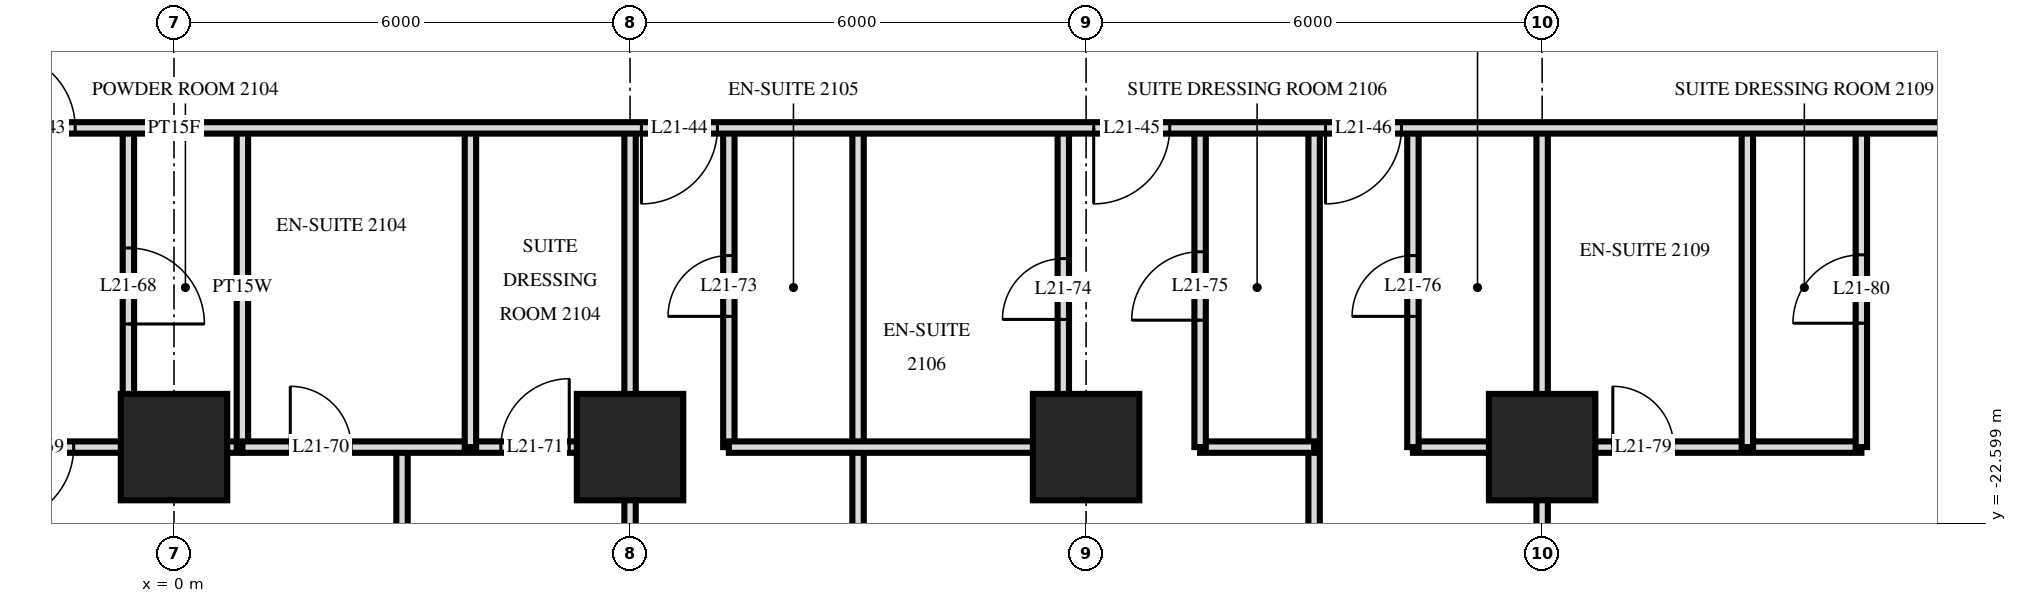
"""IFC4 building model, lengths in metres.
Left out: names, types, materials, properties, quantities, classifications, styles, units other than length and angle.
Written with IfcOpenShell. Run it as: python <this file> out.ifc"""

import sys

from ifc_helpers import new_model, si_unit, direction, frame, frame_2d, origin, origin_2d, place, context, subcontext, project, spatial, rectangle, extrude, element, fill, save


model = new_model("IFC4")
c1 = context("Model", 3, precision=1e-05, world=origin(), true_north=direction((0.0, 1.0)))
c2 = subcontext(c1, "Body", "Model", "MODEL_VIEW")
j1 = project(units=[si_unit("LENGTHUNIT", "METRE"), si_unit("PLANEANGLEUNIT", "RADIAN")], contexts=[c1])
p1 = place(None, origin())
s1 = spatial("IfcSite", under=j1, at=p1, CompositionType="ELEMENT")
p2 = place(p1, origin())
s2 = spatial("IfcBuilding", under=s1, at=p2, CompositionType="ELEMENT")
p3 = place(p2, frame((0.0, 0.0, 85.2)))
s3 = spatial("IfcBuildingStorey", under=s2, at=p3, CompositionType="ELEMENT", Elevation=85.2)
for number, where, z_axis, x_axis in (
    (1, (0.0, -21.6, 0.0), (0.0, 0.0, 1.0), (1.0, 0.0, 0.0)),
    (2, (6.0, -21.6, 0.0), (0.0, 0.0, 1.0), (1.0, 0.0, 0.0)),
    (3, (12.0, -21.6, 0.0), (0.0, 0.0, 1.0), (1.0, 0.0, 0.0)),
    (4, (18.0, -21.6, 0.0), (0.0, 0.0, 1.0), (1.0, 0.0, 0.0)),
):
    element("IfcColumn", number, at=place(p3, frame(where, z_axis=z_axis, x_axis=x_axis)), inside=s3, PredefinedType="COLUMN", context=c2, shape_type="SweptSolid", body=[
        extrude(rectangle(XDim=1.4, YDim=1.4, at=origin_2d()), origin(), (0.0, 0.0, 1.0), 3.6),
    ])
p4 = place(p3, frame((22.2, -21.6, 0.0), z_axis=(0.0, 0.0, 1.0), x_axis=(0.0, 1.0, 0.0)))
e5 = element("IfcWall", 5, at=p4, inside=s3, PredefinedType="PARTITIONING", context=c2, shape_type="SweptSolid", body=[
    extrude(rectangle(XDim=4.2, YDim=0.15, at=frame_2d((2.1, 0.0))), origin(), (0.0, 0.0, 1.0), 3.32),
])
p5 = place(p4, frame((1.63, 0.0, 0.0)))
e6 = element("IfcOpeningElement", 6, at=p5, cuts=e5, PredefinedType="OPENING", context=c2, shape_type="SweptSolid", body=[
    extrude(rectangle(XDim=0.9, YDim=2.1, at=frame_2d((0.45, 1.05))), frame((0.0, 0.085, 0.0), z_axis=(0.0, -1.0, 0.0), x_axis=(1.0, 0.0, 0.0)), (0.0, 0.0, 1.0), 0.17),
])
p6 = place(p3, frame((20.7, -21.6, 0.0), z_axis=(0.0, 0.0, 1.0), x_axis=(0.0, 1.0, 0.0)))
e7 = element("IfcWall", 7, at=p6, inside=s3, PredefinedType="PARTITIONING", context=c2, shape_type="SweptSolid", body=[
    extrude(rectangle(XDim=4.2, YDim=0.15, at=frame_2d((2.1, 0.0))), origin(), (0.0, 0.0, 1.0), 3.32),
])
p7 = place(p3, frame((18.0, -29.22, 0.0), z_axis=(0.0, 0.0, 1.0), x_axis=(0.0, 1.0, 0.0)))
e8 = element("IfcWall", 8, at=p7, inside=s3, PredefinedType="PARTITIONING", context=c2, shape_type="SweptSolid", body=[
    extrude(rectangle(XDim=11.82, YDim=0.15, at=frame_2d((5.91, 0.0))), origin(), (0.0, 0.0, 1.0), 3.32),
])
p8 = place(p3, frame((16.3, -21.6, 0.0), z_axis=(0.0, 0.0, 1.0), x_axis=(0.0, 1.0, 0.0)))
e9 = element("IfcWall", 9, at=p8, inside=s3, PredefinedType="PARTITIONING", context=c2, shape_type="SweptSolid", body=[
    extrude(rectangle(XDim=4.2, YDim=0.15, at=frame_2d((2.1, 0.0))), origin(), (0.0, 0.0, 1.0), 3.32),
])
p9 = place(p8, frame((1.72, 0.0, 0.0)))
e10 = element("IfcOpeningElement", 10, at=p9, cuts=e9, PredefinedType="OPENING", context=c2, shape_type="SweptSolid", body=[
    extrude(rectangle(XDim=0.8, YDim=2.1, at=frame_2d((0.4, 1.05))), frame((0.0, 0.085, 0.0), z_axis=(0.0, -1.0, 0.0), x_axis=(1.0, 0.0, 0.0)), (0.0, 0.0, 1.0), 0.17),
])
p10 = place(p3, frame((15.0, -29.22, 0.0), z_axis=(0.0, 0.0, 1.0), x_axis=(0.0, 1.0, 0.0)))
e11 = element("IfcWall", 11, at=p10, inside=s3, PredefinedType="PARTITIONING", context=c2, shape_type="SweptSolid", body=[
    extrude(rectangle(XDim=11.82, YDim=0.15, at=frame_2d((5.91, 0.0))), origin(), (0.0, 0.0, 1.0), 3.32),
])
p11 = place(p3, frame((13.5, -21.6, 0.0), z_axis=(0.0, 0.0, 1.0), x_axis=(0.0, 1.0, 0.0)))
e12 = element("IfcWall", 12, at=p11, inside=s3, PredefinedType="PARTITIONING", context=c2, shape_type="SweptSolid", body=[
    extrude(rectangle(XDim=4.2, YDim=0.15, at=frame_2d((2.1, 0.0))), origin(), (0.0, 0.0, 1.0), 3.32),
])
p12 = place(p11, frame((1.67, 0.0, 0.0)))
e13 = element("IfcOpeningElement", 13, at=p12, cuts=e12, PredefinedType="OPENING", context=c2, shape_type="SweptSolid", body=[
    extrude(rectangle(XDim=0.9, YDim=2.1, at=frame_2d((0.45, 1.05))), frame((0.0, 0.085, 0.0), z_axis=(0.0, -1.0, 0.0), x_axis=(1.0, 0.0, 0.0)), (0.0, 0.0, 1.0), 0.17),
])
p13 = place(p3, frame((11.7, -21.6, 0.0), z_axis=(0.0, 0.0, 1.0), x_axis=(0.0, 1.0, 0.0)))
e14 = element("IfcWall", 14, at=p13, inside=s3, PredefinedType="PARTITIONING", context=c2, shape_type="SweptSolid", body=[
    extrude(rectangle(XDim=4.2, YDim=0.15, at=frame_2d((2.1, 0.0))), origin(), (0.0, 0.0, 1.0), 3.32),
])
p14 = place(p13, frame((1.68, 0.0, 0.0)))
e15 = element("IfcOpeningElement", 15, at=p14, cuts=e14, PredefinedType="OPENING", context=c2, shape_type="SweptSolid", body=[
    extrude(rectangle(XDim=0.8, YDim=2.1, at=frame_2d((0.4, 1.05))), frame((0.0, 0.085, 0.0), z_axis=(0.0, -1.0, 0.0), x_axis=(1.0, 0.0, 0.0)), (0.0, 0.0, 1.0), 0.17),
])
p15 = place(p3, frame((9.0, -29.22, 0.0), z_axis=(0.0, 0.0, 1.0), x_axis=(0.0, 1.0, 0.0)))
e16 = element("IfcWall", 16, at=p15, inside=s3, PredefinedType="PARTITIONING", context=c2, shape_type="SweptSolid", body=[
    extrude(rectangle(XDim=11.82, YDim=0.15, at=frame_2d((5.91, 0.0))), origin(), (0.0, 0.0, 1.0), 3.32),
])
p16 = place(p3, frame((7.3, -21.6, 0.0), z_axis=(0.0, 0.0, 1.0), x_axis=(0.0, 1.0, 0.0)))
e17 = element("IfcWall", 17, at=p16, inside=s3, PredefinedType="PARTITIONING", context=c2, shape_type="SweptSolid", body=[
    extrude(rectangle(XDim=4.2, YDim=0.15, at=frame_2d((2.1, 0.0))), origin(), (0.0, 0.0, 1.0), 3.32),
])
p17 = place(p16, frame((1.72, 0.0, 0.0)))
e18 = element("IfcOpeningElement", 18, at=p17, cuts=e17, PredefinedType="OPENING", context=c2, shape_type="SweptSolid", body=[
    extrude(rectangle(XDim=0.8, YDim=2.1, at=frame_2d((0.4, 1.05))), frame((0.0, 0.085, 0.0), z_axis=(0.0, -1.0, 0.0), x_axis=(1.0, 0.0, 0.0)), (0.0, 0.0, 1.0), 0.17),
])
p18 = place(p3, frame((6.0, -29.22, 0.0), z_axis=(0.0, 0.0, 1.0), x_axis=(0.0, 1.0, 0.0)))
e19 = element("IfcWall", 19, at=p18, inside=s3, PredefinedType="PARTITIONING", context=c2, shape_type="SweptSolid", body=[
    extrude(rectangle(XDim=11.82, YDim=0.15, at=frame_2d((5.91, 0.0))), origin(), (0.0, 0.0, 1.0), 3.32),
])
p19 = place(p3, frame((3.9, -21.6, 0.0), z_axis=(0.0, 0.0, 1.0), x_axis=(0.0, 1.0, 0.0)))
e20 = element("IfcWall", 20, at=p19, inside=s3, PredefinedType="PARTITIONING", context=c2, shape_type="SweptSolid", body=[
    extrude(rectangle(XDim=4.2, YDim=0.15, at=frame_2d((2.1, 0.0))), origin(), (0.0, 0.0, 1.0), 3.32),
])
p20 = place(p3, frame((3.0, -29.22, 0.0), z_axis=(0.0, 0.0, 1.0), x_axis=(0.0, 1.0, 0.0)))
e21 = element("IfcWall", 21, at=p20, inside=s3, PredefinedType="PARTITIONING", context=c2, shape_type="SweptSolid", body=[
    extrude(rectangle(XDim=7.62, YDim=0.15, at=frame_2d((3.81, 0.0))), origin(), (0.0, 0.0, 1.0), 3.32),
])
p21 = place(p20, frame((3.27, 0.0, 0.0)))
e22 = element("IfcOpeningElement", 22, at=p21, cuts=e21, PredefinedType="OPENING", context=c2, shape_type="SweptSolid", body=[
    extrude(rectangle(XDim=0.9, YDim=2.1, at=frame_2d((0.45, 1.05))), frame((0.0, 0.085, 0.0), z_axis=(0.0, -1.0, 0.0), x_axis=(1.0, 0.0, 0.0)), (0.0, 0.0, 1.0), 0.17),
])
p22 = place(p3, frame((0.9, -21.6, 0.0), z_axis=(0.0, 0.0, 1.0), x_axis=(0.0, 1.0, 0.0)))
e23 = element("IfcWall", 23, at=p22, inside=s3, PredefinedType="PLUMBINGWALL", context=c2, shape_type="SweptSolid", body=[
    extrude(rectangle(XDim=4.2, YDim=0.15, at=frame_2d((2.1, 0.0))), origin(), (0.0, 0.0, 1.0), 3.32),
])
p23 = place(p3, frame((-0.6, -21.6, 0.0), z_axis=(0.0, 0.0, 1.0), x_axis=(0.0, 1.0, 0.0)))
e24 = element("IfcWall", 24, at=p23, inside=s3, PredefinedType="PARTITIONING", context=c2, shape_type="SweptSolid", body=[
    extrude(rectangle(XDim=4.2, YDim=0.15, at=frame_2d((2.1, 0.0))), origin(), (0.0, 0.0, 1.0), 3.32),
])
p24 = place(p23, frame((1.62, 0.0, 0.0)))
e25 = element("IfcOpeningElement", 25, at=p24, cuts=e24, PredefinedType="OPENING", context=c2, shape_type="SweptSolid", body=[
    extrude(rectangle(XDim=1.0, YDim=2.1, at=frame_2d((0.5, 1.05))), frame((0.0, 0.085, 0.0), z_axis=(0.0, -1.0, 0.0), x_axis=(1.0, 0.0, 0.0)), (0.0, 0.0, 1.0), 0.17),
])
p25 = place(p3, frame((-5.4, -21.6, 0.0), z_axis=(0.0, 0.0, 1.0), x_axis=(1.0, 0.0, 0.0)))
e26 = element("IfcWall", 26, at=p25, inside=s3, PredefinedType="PARTITIONING", context=c2, shape_type="SweptSolid", body=[
    extrude(rectangle(XDim=4.8, YDim=0.15, at=frame_2d((2.4, 0.0))), origin(), (0.0, 0.0, 1.0), 3.32),
])
p26 = place(p25, frame((0.68, 0.0, 0.0)))
e27 = element("IfcOpeningElement", 27, at=p26, cuts=e26, PredefinedType="OPENING", context=c2, shape_type="SweptSolid", body=[
    extrude(rectangle(XDim=1.0, YDim=2.1, at=frame_2d((0.5, 1.05))), frame((0.0, 0.085, 0.0), z_axis=(0.0, -1.0, 0.0), x_axis=(1.0, 0.0, 0.0)), (0.0, 0.0, 1.0), 0.17),
])
p27 = place(p25, frame((3.08, 0.0, 0.0)))
e28 = element("IfcOpeningElement", 28, at=p27, cuts=e26, PredefinedType="OPENING", context=c2, shape_type="SweptSolid", body=[
    extrude(rectangle(XDim=1.0, YDim=2.1, at=frame_2d((0.5, 1.05))), frame((0.0, 0.085, 0.0), z_axis=(0.0, -1.0, 0.0), x_axis=(1.0, 0.0, 0.0)), (0.0, 0.0, 1.0), 0.17),
])
p28 = place(p3, frame((0.9, -21.6, 0.0), z_axis=(0.0, 0.0, 1.0), x_axis=(1.0, 0.0, 0.0)))
e29 = element("IfcWall", 29, at=p28, inside=s3, PredefinedType="PARTITIONING", context=c2, shape_type="SweptSolid", body=[
    extrude(rectangle(XDim=5.1, YDim=0.15, at=frame_2d((2.55, 0.0))), origin(), (0.0, 0.0, 1.0), 3.32),
])
p29 = place(p28, frame((0.63, 0.0, 0.0)))
e30 = element("IfcOpeningElement", 30, at=p29, cuts=e29, PredefinedType="OPENING", context=c2, shape_type="SweptSolid", body=[
    extrude(rectangle(XDim=0.8, YDim=2.1, at=frame_2d((0.4, 1.05))), frame((0.0, 0.085, 0.0), z_axis=(0.0, -1.0, 0.0), x_axis=(1.0, 0.0, 0.0)), (0.0, 0.0, 1.0), 0.17),
])
p30 = place(p28, frame((3.4, 0.0, 0.0)))
e31 = element("IfcOpeningElement", 31, at=p30, cuts=e29, PredefinedType="OPENING", context=c2, shape_type="SweptSolid", body=[
    extrude(rectangle(XDim=0.9, YDim=2.1, at=frame_2d((0.45, 1.05))), frame((0.0, 0.085, 0.0), z_axis=(0.0, -1.0, 0.0), x_axis=(1.0, 0.0, 0.0)), (0.0, 0.0, 1.0), 0.17),
])
p31 = place(p3, frame((7.3, -21.6, 0.0), z_axis=(0.0, 0.0, 1.0), x_axis=(1.0, 0.0, 0.0)))
e32 = element("IfcWall", 32, at=p31, inside=s3, PredefinedType="PARTITIONING", context=c2, shape_type="SweptSolid", body=[
    extrude(rectangle(XDim=4.4, YDim=0.15, at=frame_2d((2.2, 0.0))), origin(), (0.0, 0.0, 1.0), 3.32),
])
p32 = place(p3, frame((13.5, -21.6, 0.0), z_axis=(0.0, 0.0, 1.0), x_axis=(1.0, 0.0, 0.0)))
e33 = element("IfcWall", 33, at=p32, inside=s3, PredefinedType="PARTITIONING", context=c2, shape_type="SweptSolid", body=[
    extrude(rectangle(XDim=1.5, YDim=0.15, at=frame_2d((0.75, 0.0))), origin(), (0.0, 0.0, 1.0), 3.32),
])
p33 = place(p3, frame((16.3, -21.6, 0.0), z_axis=(0.0, 0.0, 1.0), x_axis=(1.0, 0.0, 0.0)))
e34 = element("IfcWall", 34, at=p33, inside=s3, PredefinedType="PARTITIONING", context=c2, shape_type="SweptSolid", body=[
    extrude(rectangle(XDim=5.9, YDim=0.15, at=frame_2d((2.95, 0.0))), origin(), (0.0, 0.0, 1.0), 3.32),
])
p34 = place(p33, frame((2.63, 0.0, 0.0)))
e35 = element("IfcOpeningElement", 35, at=p34, cuts=e34, PredefinedType="OPENING", context=c2, shape_type="SweptSolid", body=[
    extrude(rectangle(XDim=0.8, YDim=2.1, at=frame_2d((0.4, 1.05))), frame((0.0, 0.085, 0.0), z_axis=(0.0, -1.0, 0.0), x_axis=(1.0, 0.0, 0.0)), (0.0, 0.0, 1.0), 0.17),
])
p35 = place(p3, frame((-0.6, -21.6, 0.0), z_axis=(0.0, 0.0, 1.0), x_axis=(1.0, 0.0, 0.0)))
e36 = element("IfcWall", 36, at=p35, inside=s3, PredefinedType="PLUMBINGWALL", context=c2, shape_type="SweptSolid", body=[
    extrude(rectangle(XDim=1.5, YDim=0.15, at=frame_2d((0.75, 0.0))), origin(), (0.0, 0.0, 1.0), 3.32),
])
p36 = place(p3, frame((-33.12, -17.4, 0.0), z_axis=(0.0, 0.0, 1.0), x_axis=(1.0, 0.0, 0.0)))
e37 = element("IfcWall", 37, at=p36, inside=s3, PredefinedType="PARTITIONING", context=c2, shape_type="SweptSolid", body=[
    extrude(rectangle(XDim=66.24, YDim=0.15, at=frame_2d((33.12, 0.0))), origin(), (0.0, 0.0, 1.0), 3.32),
])
p37 = place(p36, frame((10.27, 0.0, 0.0)))
e38 = element("IfcOpeningElement", 38, at=p37, cuts=e37, PredefinedType="OPENING", context=c2, shape_type="SweptSolid", body=[
    extrude(rectangle(XDim=1.0, YDim=2.1, at=frame_2d((0.5, 1.05))), frame((0.0, 0.085, 0.0), z_axis=(0.0, -1.0, 0.0), x_axis=(1.0, 0.0, 0.0)), (0.0, 0.0, 1.0), 0.17),
])
p38 = place(p36, frame((16.97, 0.0, 0.0)))
e39 = element("IfcOpeningElement", 39, at=p38, cuts=e37, PredefinedType="OPENING", context=c2, shape_type="SweptSolid", body=[
    extrude(rectangle(XDim=1.0, YDim=2.1, at=frame_2d((0.5, 1.05))), frame((0.0, 0.085, 0.0), z_axis=(0.0, -1.0, 0.0), x_axis=(1.0, 0.0, 0.0)), (0.0, 0.0, 1.0), 0.17),
])
p39 = place(p36, frame((28.42, 0.0, 0.0)))
e40 = element("IfcOpeningElement", 40, at=p39, cuts=e37, PredefinedType="OPENING", context=c2, shape_type="SweptSolid", body=[
    extrude(rectangle(XDim=1.0, YDim=2.1, at=frame_2d((0.5, 1.05))), frame((0.0, 0.085, 0.0), z_axis=(0.0, -1.0, 0.0), x_axis=(1.0, 0.0, 0.0)), (0.0, 0.0, 1.0), 0.17),
])
p40 = place(p36, frame((30.82, 0.0, 0.0)))
e41 = element("IfcOpeningElement", 41, at=p40, cuts=e37, PredefinedType="OPENING", context=c2, shape_type="SweptSolid", body=[
    extrude(rectangle(XDim=1.0, YDim=2.1, at=frame_2d((0.5, 1.05))), frame((0.0, 0.085, 0.0), z_axis=(0.0, -1.0, 0.0), x_axis=(1.0, 0.0, 0.0)), (0.0, 0.0, 1.0), 0.17),
])
p41 = place(p36, frame((39.27, 0.0, 0.0)))
e42 = element("IfcOpeningElement", 42, at=p41, cuts=e37, PredefinedType="OPENING", context=c2, shape_type="SweptSolid", body=[
    extrude(rectangle(XDim=1.0, YDim=2.1, at=frame_2d((0.5, 1.05))), frame((0.0, 0.085, 0.0), z_axis=(0.0, -1.0, 0.0), x_axis=(1.0, 0.0, 0.0)), (0.0, 0.0, 1.0), 0.17),
])
p42 = place(p36, frame((45.22, 0.0, 0.0)))
e43 = element("IfcOpeningElement", 43, at=p42, cuts=e37, PredefinedType="OPENING", context=c2, shape_type="SweptSolid", body=[
    extrude(rectangle(XDim=1.0, YDim=2.1, at=frame_2d((0.5, 1.05))), frame((0.0, 0.085, 0.0), z_axis=(0.0, -1.0, 0.0), x_axis=(1.0, 0.0, 0.0)), (0.0, 0.0, 1.0), 0.17),
])
p43 = place(p36, frame((48.27, 0.0, 0.0)))
e44 = element("IfcOpeningElement", 44, at=p43, cuts=e37, PredefinedType="OPENING", context=c2, shape_type="SweptSolid", body=[
    extrude(rectangle(XDim=1.0, YDim=2.1, at=frame_2d((0.5, 1.05))), frame((0.0, 0.085, 0.0), z_axis=(0.0, -1.0, 0.0), x_axis=(1.0, 0.0, 0.0)), (0.0, 0.0, 1.0), 0.17),
])
p44 = place(p36, frame((1.87, 0.0, 0.0)))
e45 = element("IfcOpeningElement", 45, at=p44, cuts=e37, PredefinedType="OPENING", context=c2, shape_type="SweptSolid", body=[
    extrude(rectangle(XDim=1.0, YDim=2.1, at=frame_2d((0.5, 1.05))), frame((0.0, 0.085, 0.0), z_axis=(0.0, -1.0, 0.0), x_axis=(1.0, 0.0, 0.0)), (0.0, 0.0, 1.0), 0.17),
])
p45 = place(p36, frame((60.37, 0.0, 0.0)))
e46 = element("IfcOpeningElement", 46, at=p45, cuts=e37, PredefinedType="OPENING", context=c2, shape_type="SweptSolid", body=[
    extrude(rectangle(XDim=1.0, YDim=2.1, at=frame_2d((0.5, 1.05))), frame((0.0, 0.085, 0.0), z_axis=(0.0, -1.0, 0.0), x_axis=(1.0, 0.0, 0.0)), (0.0, 0.0, 1.0), 0.17),
])
p46 = place(p40, origin())
e47 = element("IfcDoor", 47, at=p46, inside=s3, OperationType="SINGLE_SWING_RIGHT", PredefinedType="DOOR", context=c2, shape_type="SweptSolid", body=[
    extrude(rectangle(XDim=1.0, YDim=2.1, at=frame_2d((0.5, 1.05))), frame((0.0, 0.025, 0.0), z_axis=(0.0, -1.0, 0.0), x_axis=(1.0, 0.0, 0.0)), (0.0, 0.0, 1.0), 0.05),
])
fill(e41, e47)
p47 = place(p41, frame((0.5, 0.0, 0.0), z_axis=(0.0, 0.0, 1.0), x_axis=(-1.0, 0.0, 0.0)))
e48 = element("IfcDoor", 48, at=p47, inside=s3, OperationType="SINGLE_SWING_LEFT", PredefinedType="DOOR", context=c2, shape_type="SweptSolid", body=[
    extrude(rectangle(XDim=1.0, YDim=2.1, at=frame_2d((0.0, 1.05))), frame((0.0, -0.025, 0.0), z_axis=(0.0, 1.0, 0.0), x_axis=(-1.0, 0.0, 0.0)), (0.0, 0.0, 1.0), 0.05),
])
fill(e42, e48)
p48 = place(p42, frame((0.5, 0.0, 0.0), z_axis=(0.0, 0.0, 1.0), x_axis=(-1.0, 0.0, 0.0)))
e49 = element("IfcDoor", 49, at=p48, inside=s3, OperationType="SINGLE_SWING_LEFT", PredefinedType="DOOR", context=c2, shape_type="SweptSolid", body=[
    extrude(rectangle(XDim=1.0, YDim=2.1, at=frame_2d((0.0, 1.05))), frame((0.0, -0.025, 0.0), z_axis=(0.0, 1.0, 0.0), x_axis=(-1.0, 0.0, 0.0)), (0.0, 0.0, 1.0), 0.05),
])
fill(e43, e49)
p49 = place(p43, frame((0.5, 0.0, 0.0), z_axis=(0.0, 0.0, 1.0), x_axis=(-1.0, 0.0, 0.0)))
e50 = element("IfcDoor", 50, at=p49, inside=s3, OperationType="SINGLE_SWING_LEFT", PredefinedType="DOOR", context=c2, shape_type="SweptSolid", body=[
    extrude(rectangle(XDim=1.0, YDim=2.1, at=frame_2d((0.0, 1.05))), frame((0.0, -0.025, 0.0), z_axis=(0.0, 1.0, 0.0), x_axis=(-1.0, 0.0, 0.0)), (0.0, 0.0, 1.0), 0.05),
])
fill(e44, e50)
p50 = place(p24, frame((0.5, 0.0, 0.0), z_axis=(0.0, 0.0, 1.0), x_axis=(-1.0, 0.0, 0.0)))
e51 = element("IfcDoor", 51, at=p50, inside=s3, OperationType="SINGLE_SWING_LEFT", PredefinedType="DOOR", context=c2, shape_type="SweptSolid", body=[
    extrude(rectangle(XDim=1.0, YDim=2.1, at=frame_2d((0.0, 1.05))), frame((0.0, -0.025, 0.0), z_axis=(0.0, 1.0, 0.0), x_axis=(-1.0, 0.0, 0.0)), (0.0, 0.0, 1.0), 0.05),
])
fill(e25, e51)
p51 = place(p27, frame((0.5, 0.0, 0.0), z_axis=(0.0, 0.0, 1.0), x_axis=(-1.0, 0.0, 0.0)))
e52 = element("IfcDoor", 52, at=p51, inside=s3, OperationType="SINGLE_SWING_LEFT", PredefinedType="DOOR", context=c2, shape_type="SweptSolid", body=[
    extrude(rectangle(XDim=1.0, YDim=2.1, at=frame_2d((0.0, 1.05))), frame((0.0, -0.025, 0.0), z_axis=(0.0, 1.0, 0.0), x_axis=(-1.0, 0.0, 0.0)), (0.0, 0.0, 1.0), 0.05),
])
fill(e28, e52)
p52 = place(p29, origin())
e53 = element("IfcDoor", 53, at=p52, inside=s3, OperationType="SINGLE_SWING_RIGHT", PredefinedType="DOOR", context=c2, shape_type="SweptSolid", body=[
    extrude(rectangle(XDim=0.8, YDim=2.1, at=frame_2d((0.4, 1.05))), frame((0.0, 0.025, 0.0), z_axis=(0.0, -1.0, 0.0), x_axis=(1.0, 0.0, 0.0)), (0.0, 0.0, 1.0), 0.05),
])
fill(e30, e53)
p53 = place(p30, origin())
e54 = element("IfcDoor", 54, at=p53, inside=s3, OperationType="SINGLE_SWING_LEFT", PredefinedType="DOOR", context=c2, shape_type="SweptSolid", body=[
    extrude(rectangle(XDim=0.9, YDim=2.1, at=frame_2d((0.45, 1.05))), frame((0.0, 0.025, 0.0), z_axis=(0.0, -1.0, 0.0), x_axis=(1.0, 0.0, 0.0)), (0.0, 0.0, 1.0), 0.05),
])
fill(e31, e54)
p54 = place(p17, origin())
e55 = element("IfcDoor", 55, at=p54, inside=s3, OperationType="SINGLE_SWING_RIGHT", PredefinedType="DOOR", context=c2, shape_type="SweptSolid", body=[
    extrude(rectangle(XDim=0.8, YDim=2.1, at=frame_2d((0.4, 1.05))), frame((0.0, 0.025, 0.0), z_axis=(0.0, -1.0, 0.0), x_axis=(1.0, 0.0, 0.0)), (0.0, 0.0, 1.0), 0.05),
])
fill(e18, e55)
p55 = place(p14, origin())
e56 = element("IfcDoor", 56, at=p55, inside=s3, OperationType="SINGLE_SWING_RIGHT", PredefinedType="DOOR", context=c2, shape_type="SweptSolid", body=[
    extrude(rectangle(XDim=0.8, YDim=2.1, at=frame_2d((0.4, 1.05))), frame((0.0, 0.025, 0.0), z_axis=(0.0, -1.0, 0.0), x_axis=(1.0, 0.0, 0.0)), (0.0, 0.0, 1.0), 0.05),
])
fill(e15, e56)
p56 = place(p12, origin())
e57 = element("IfcDoor", 57, at=p56, inside=s3, OperationType="SINGLE_SWING_RIGHT", PredefinedType="DOOR", context=c2, shape_type="SweptSolid", body=[
    extrude(rectangle(XDim=0.9, YDim=2.1, at=frame_2d((0.45, 1.05))), frame((0.0, 0.025, 0.0), z_axis=(0.0, -1.0, 0.0), x_axis=(1.0, 0.0, 0.0)), (0.0, 0.0, 1.0), 0.05),
])
fill(e13, e57)
p57 = place(p9, origin())
e58 = element("IfcDoor", 58, at=p57, inside=s3, OperationType="SINGLE_SWING_RIGHT", PredefinedType="DOOR", context=c2, shape_type="SweptSolid", body=[
    extrude(rectangle(XDim=0.8, YDim=2.1, at=frame_2d((0.4, 1.05))), frame((0.0, 0.025, 0.0), z_axis=(0.0, -1.0, 0.0), x_axis=(1.0, 0.0, 0.0)), (0.0, 0.0, 1.0), 0.05),
])
fill(e10, e58)
p58 = place(p34, origin())
e59 = element("IfcDoor", 59, at=p58, inside=s3, OperationType="SINGLE_SWING_RIGHT", PredefinedType="DOOR", context=c2, shape_type="SweptSolid", body=[
    extrude(rectangle(XDim=0.8, YDim=2.1, at=frame_2d((0.4, 1.05))), frame((0.0, 0.025, 0.0), z_axis=(0.0, -1.0, 0.0), x_axis=(1.0, 0.0, 0.0)), (0.0, 0.0, 1.0), 0.05),
])
fill(e35, e59)
p59 = place(p5, origin())
e60 = element("IfcDoor", 60, at=p59, inside=s3, OperationType="SINGLE_SWING_RIGHT", PredefinedType="DOOR", context=c2, shape_type="SweptSolid", body=[
    extrude(rectangle(XDim=0.9, YDim=2.1, at=frame_2d((0.45, 1.05))), frame((0.0, 0.025, 0.0), z_axis=(0.0, -1.0, 0.0), x_axis=(1.0, 0.0, 0.0)), (0.0, 0.0, 1.0), 0.05),
])
fill(e6, e60)
save(model, sys.argv[1])
